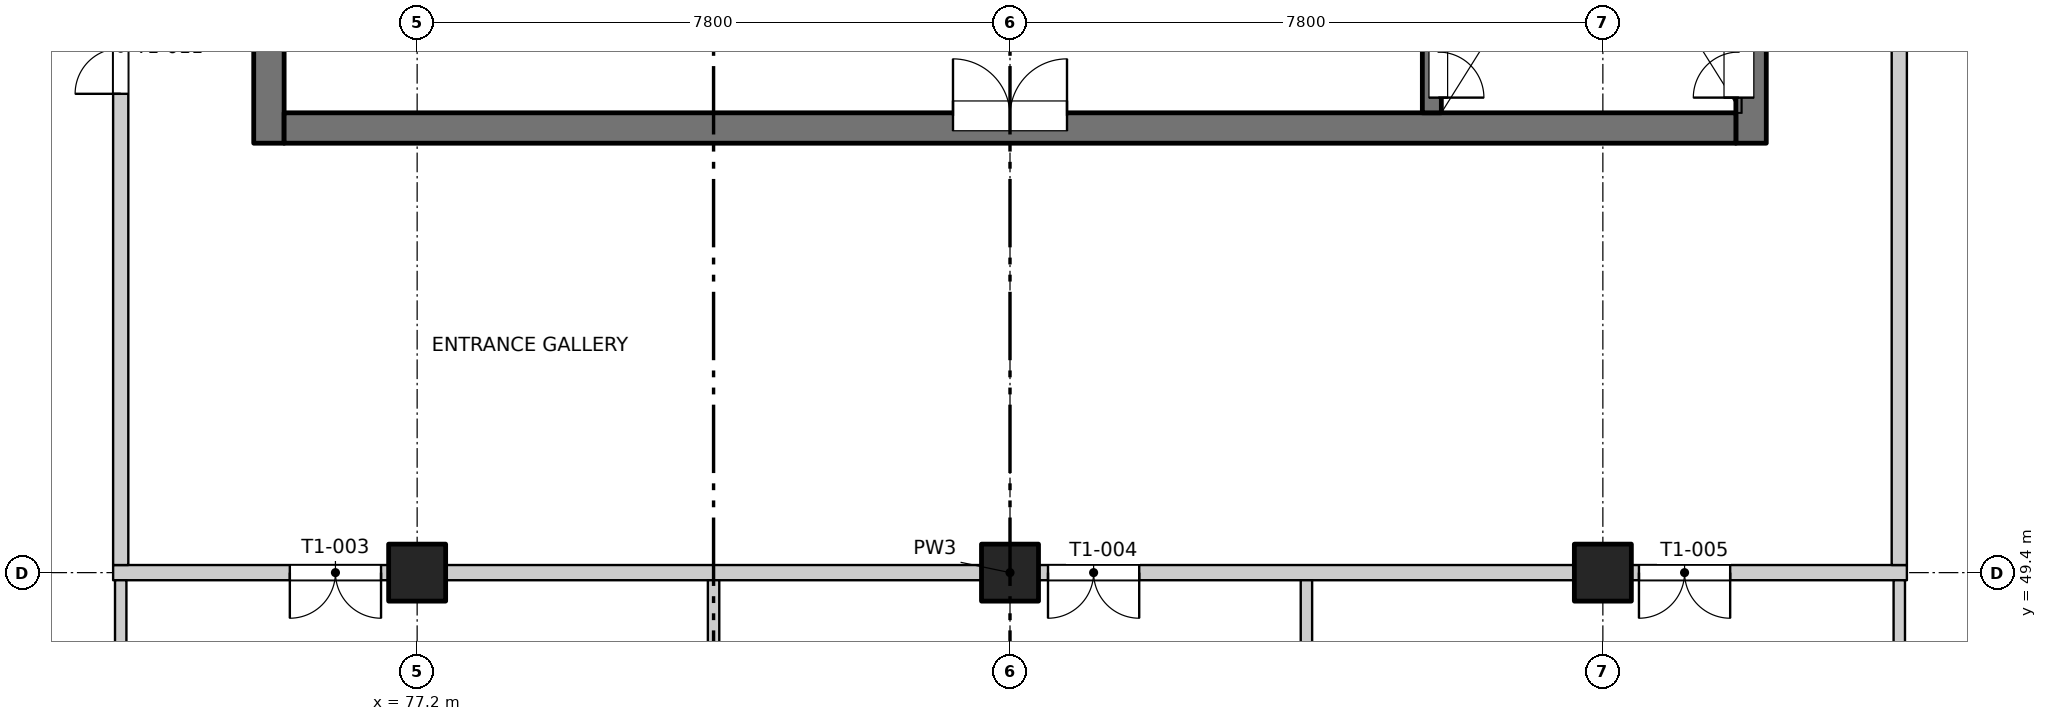
"""IFC4 building model, lengths in metres.
Left out: names, types, materials, properties, quantities, classifications, styles, units other than length and angle.
Written with IfcOpenShell. Run it as: python <this file> out.ifc"""

import sys

from ifc_helpers import new_model, si_unit, direction, frame, frame_2d, origin, origin_2d, place, context, subcontext, project, spatial, rectangle, extrude, element, fill, save


model = new_model("IFC4")
c1 = context("Model", 3, precision=1e-05, world=origin(), true_north=direction((0.0, 1.0)))
c2 = subcontext(c1, "Body", "Model", "MODEL_VIEW")
j1 = project(units=[si_unit("LENGTHUNIT", "METRE"), si_unit("PLANEANGLEUNIT", "RADIAN")], contexts=[c1])
p1 = place(None, origin())
s1 = spatial("IfcSite", under=j1, at=p1, CompositionType="ELEMENT")
p2 = place(p1, origin())
s2 = spatial("IfcBuilding", under=s1, at=p2, CompositionType="ELEMENT")
p3 = place(p2, frame((0.0, 0.0, 263.0)))
s3 = spatial("IfcBuildingStorey", under=s2, at=p3, CompositionType="ELEMENT", Elevation=263.0)
for number, where, z_axis, x_axis in (
    (1, (77.2, 49.4, -0.25), (0.0, 0.0, 1.0), (1.0, 0.0, 0.0)),
    (2, (85.0, 49.4, -0.25), (0.0, 0.0, 1.0), (1.0, 0.0, 0.0)),
    (3, (92.8, 49.4, -0.25), (0.0, 0.0, 1.0), (1.0, 0.0, 0.0)),
):
    element("IfcColumn", number, at=place(p3, frame(where, z_axis=z_axis, x_axis=x_axis)), inside=s3, PredefinedType="COLUMN", context=c2, shape_type="SweptSolid", body=[
        extrude(rectangle(XDim=0.75, YDim=0.75, at=origin_2d()), origin(), (0.0, 0.0, 1.0), 3.35),
    ])
p4 = place(p3, frame((75.25, 55.05, -0.25), z_axis=(0.0, 0.0, 1.0), x_axis=(0.0, 1.0, 0.0)))
e4 = element("IfcWall", 4, at=p4, inside=s3, PredefinedType="SOLIDWALL", context=c2, shape_type="SweptSolid", body=[
    extrude(rectangle(XDim=22.25, YDim=0.4, at=frame_2d((11.125, 0.0))), origin(), (0.0, 0.0, 1.0), 3.35),
])
p5 = place(p4, frame((7.4, 0.0, 0.25)))
e5 = element("IfcOpeningElement", 5, at=p5, cuts=e4, PredefinedType="OPENING", context=c2, shape_type="SweptSolid", body=[
    extrude(rectangle(XDim=0.9, YDim=2.1, at=frame_2d((0.45, 1.05))), frame((0.0, 0.21, 0.0), z_axis=(0.0, -1.0, 0.0), x_axis=(1.0, 0.0, 0.0)), (0.0, 0.0, 1.0), 0.42),
])
p6 = place(p4, frame((12.05, 0.0, 0.25)))
e6 = element("IfcOpeningElement", 6, at=p6, cuts=e4, PredefinedType="OPENING", context=c2, shape_type="SweptSolid", body=[
    extrude(rectangle(XDim=0.9, YDim=2.1, at=frame_2d((0.45, 1.05))), frame((0.0, 0.21, 0.0), z_axis=(0.0, -1.0, 0.0), x_axis=(1.0, 0.0, 0.0)), (0.0, 0.0, 1.0), 0.42),
])
p7 = place(p4, frame((16.55, 0.0, 0.25)))
e7 = element("IfcOpeningElement", 7, at=p7, cuts=e4, PredefinedType="OPENING", context=c2, shape_type="SweptSolid", body=[
    extrude(rectangle(XDim=0.9, YDim=2.1, at=frame_2d((0.45, 1.05))), frame((0.0, 0.21, 0.0), z_axis=(0.0, -1.0, 0.0), x_axis=(1.0, 0.0, 0.0)), (0.0, 0.0, 1.0), 0.42),
])
p8 = place(p4, frame((20.0, 0.0, 0.25)))
e8 = element("IfcOpeningElement", 8, at=p8, cuts=e4, PredefinedType="OPENING", context=c2, shape_type="SweptSolid", body=[
    extrude(rectangle(XDim=0.9, YDim=2.1, at=frame_2d((0.45, 1.05))), frame((0.0, 0.21, 0.0), z_axis=(0.0, -1.0, 0.0), x_axis=(1.0, 0.0, 0.0)), (0.0, 0.0, 1.0), 0.42),
])
p9 = place(p3, frame((94.75, 55.05, -0.25), z_axis=(0.0, 0.0, 1.0), x_axis=(0.0, 1.0, 0.0)))
e9 = element("IfcWall", 9, at=p9, inside=s3, PredefinedType="SOLIDWALL", context=c2, shape_type="SweptSolid", body=[
    extrude(rectangle(XDim=6.9, YDim=0.4, at=frame_2d((3.45, 0.0))), origin(), (0.0, 0.0, 1.0), 3.35),
])
p10 = place(p9, frame((0.6, 0.0, 0.25)))
e10 = element("IfcOpeningElement", 10, at=p10, cuts=e9, PredefinedType="OPENING", context=c2, shape_type="SweptSolid", body=[
    extrude(rectangle(XDim=1.2, YDim=2.1, at=frame_2d((0.6, 1.05))), frame((0.0, 0.21, 0.0), z_axis=(0.0, -1.0, 0.0), x_axis=(1.0, 0.0, 0.0)), (0.0, 0.0, 1.0), 0.42),
])
p11 = place(p3, frame((75.45, 55.25, -0.25), z_axis=(0.0, 0.0, 1.0), x_axis=(1.0, 0.0, 0.0)))
e11 = element("IfcWall", 11, at=p11, inside=s3, PredefinedType="SOLIDWALL", context=c2, shape_type="SweptSolid", body=[
    extrude(rectangle(XDim=19.1, YDim=0.4, at=frame_2d((9.55, 0.0))), origin(), (0.0, 0.0, 1.0), 3.35),
])
p12 = place(p11, frame((8.8, 0.0, 0.25)))
e12 = element("IfcOpeningElement", 12, at=p12, cuts=e11, PredefinedType="OPENING", context=c2, shape_type="SweptSolid", body=[
    extrude(rectangle(XDim=1.5, YDim=2.1, at=frame_2d((0.75, 1.05))), frame((0.0, 0.21, 0.0), z_axis=(0.0, -1.0, 0.0), x_axis=(1.0, 0.0, 0.0)), (0.0, 0.0, 1.0), 0.42),
])
p13 = place(p3, frame((90.55, 55.45, -0.25), z_axis=(0.0, 0.0, 1.0), x_axis=(0.0, 1.0, 0.0)))
e13 = element("IfcWall", 13, at=p13, inside=s3, PredefinedType="SOLIDWALL", context=c2, shape_type="SweptSolid", body=[
    extrude(rectangle(XDim=6.5, YDim=0.25, at=frame_2d((3.25, 0.0))), origin(), (0.0, 0.0, 1.0), 3.35),
])
p14 = place(p13, frame((0.2, 0.0, 0.25)))
e14 = element("IfcOpeningElement", 14, at=p14, cuts=e13, PredefinedType="OPENING", context=c2, shape_type="SweptSolid", body=[
    extrude(rectangle(XDim=1.2, YDim=2.1, at=frame_2d((0.6, 1.05))), frame((0.0, 0.135, 0.0), z_axis=(0.0, -1.0, 0.0), x_axis=(1.0, 0.0, 0.0)), (0.0, 0.0, 1.0), 0.27),
])
p15 = place(p3, frame((73.2, 49.4, 0.0), z_axis=(0.0, 0.0, 1.0), x_axis=(1.0, 0.0, 0.0)))
e15 = element("IfcWall", 15, at=p15, inside=s3, PredefinedType="PARTITIONING", context=c2, shape_type="SweptSolid", body=[
    extrude(rectangle(XDim=23.6, YDim=0.2, at=frame_2d((11.8, 0.0))), origin(), (0.0, 0.0, 1.0), 3.1),
])
p16 = place(p15, frame((2.325, 0.0, 0.0)))
e16 = element("IfcOpeningElement", 16, at=p16, cuts=e15, PredefinedType="OPENING", context=c2, shape_type="SweptSolid", body=[
    extrude(rectangle(XDim=1.2, YDim=2.1, at=frame_2d((0.6, 1.05))), frame((0.0, 0.11, 0.0), z_axis=(0.0, -1.0, 0.0), x_axis=(1.0, 0.0, 0.0)), (0.0, 0.0, 1.0), 0.22),
])
p17 = place(p15, frame((12.3, 0.0, 0.0)))
e17 = element("IfcOpeningElement", 17, at=p17, cuts=e15, PredefinedType="OPENING", context=c2, shape_type="SweptSolid", body=[
    extrude(rectangle(XDim=1.2, YDim=2.1, at=frame_2d((0.6, 1.05))), frame((0.0, 0.11, 0.0), z_axis=(0.0, -1.0, 0.0), x_axis=(1.0, 0.0, 0.0)), (0.0, 0.0, 1.0), 0.22),
])
p18 = place(p15, frame((20.075, 0.0, 0.0)))
e18 = element("IfcOpeningElement", 18, at=p18, cuts=e15, PredefinedType="OPENING", context=c2, shape_type="SweptSolid", body=[
    extrude(rectangle(XDim=1.2, YDim=2.1, at=frame_2d((0.6, 1.05))), frame((0.0, 0.11, 0.0), z_axis=(0.0, -1.0, 0.0), x_axis=(1.0, 0.0, 0.0)), (0.0, 0.0, 1.0), 0.22),
])
p19 = place(p3, frame((73.3, 45.635, 0.0), z_axis=(0.0, 0.0, 1.0), x_axis=(0.0, 1.0, 0.0)))
e19 = element("IfcWall", 19, at=p19, inside=s3, PredefinedType="PARTITIONING", context=c2, shape_type="SweptSolid", body=[
    extrude(rectangle(XDim=3.665, YDim=0.15, at=frame_2d((1.833, 0.0))), origin(), (0.0, 0.0, 1.0), 3.1),
])
p20 = place(p3, frame((73.3, 49.5, 0.0), z_axis=(0.0, 0.0, 1.0), x_axis=(0.0, 1.0, 0.0)))
e20 = element("IfcWall", 20, at=p20, inside=s3, PredefinedType="PARTITIONING", context=c2, shape_type="SweptSolid", body=[
    extrude(rectangle(XDim=34.865, YDim=0.2, at=frame_2d((17.433, 0.0))), origin(), (0.0, 0.0, 1.0), 3.1),
])
p21 = place(p20, frame((6.2, 0.0, 0.0)))
e21 = element("IfcOpeningElement", 21, at=p21, cuts=e20, PredefinedType="OPENING", context=c2, shape_type="SweptSolid", body=[
    extrude(rectangle(XDim=1.2, YDim=2.1, at=frame_2d((0.6, 1.05))), frame((0.0, 0.11, 0.0), z_axis=(0.0, -1.0, 0.0), x_axis=(1.0, 0.0, 0.0)), (0.0, 0.0, 1.0), 0.22),
])
p22 = place(p20, frame((12.95, 0.0, 0.0)))
e22 = element("IfcOpeningElement", 22, at=p22, cuts=e20, PredefinedType="OPENING", context=c2, shape_type="SweptSolid", body=[
    extrude(rectangle(XDim=1.2, YDim=2.1, at=frame_2d((0.6, 1.05))), frame((0.0, 0.11, 0.0), z_axis=(0.0, -1.0, 0.0), x_axis=(1.0, 0.0, 0.0)), (0.0, 0.0, 1.0), 0.22),
])
p23 = place(p20, frame((24.65, 0.0, 0.0)))
e23 = element("IfcOpeningElement", 23, at=p23, cuts=e20, PredefinedType="OPENING", context=c2, shape_type="SweptSolid", body=[
    extrude(rectangle(XDim=1.2, YDim=2.1, at=frame_2d((0.6, 1.05))), frame((0.0, 0.11, 0.0), z_axis=(0.0, -1.0, 0.0), x_axis=(1.0, 0.0, 0.0)), (0.0, 0.0, 1.0), 0.22),
])
p24 = place(p20, frame((27.571, 0.0, 0.0)))
e24 = element("IfcOpeningElement", 24, at=p24, cuts=e20, PredefinedType="OPENING", context=c2, shape_type="SweptSolid", body=[
    extrude(rectangle(XDim=0.9, YDim=2.1, at=frame_2d((0.45, 1.05))), frame((0.0, 0.11, 0.0), z_axis=(0.0, -1.0, 0.0), x_axis=(1.0, 0.0, 0.0)), (0.0, 0.0, 1.0), 0.22),
])
p25 = place(p20, frame((32.45, 0.0, 0.0)))
e25 = element("IfcOpeningElement", 25, at=p25, cuts=e20, PredefinedType="OPENING", context=c2, shape_type="SweptSolid", body=[
    extrude(rectangle(XDim=1.2, YDim=2.1, at=frame_2d((0.6, 1.05))), frame((0.0, 0.11, 0.0), z_axis=(0.0, -1.0, 0.0), x_axis=(1.0, 0.0, 0.0)), (0.0, 0.0, 1.0), 0.22),
])
for number, where, z_axis, x_axis in (
    (26, (81.1, 45.635, 0.0), (0.0, 0.0, 1.0), (0.0, 1.0, 0.0)),
    (27, (88.9, 45.635, 0.0), (0.0, 0.0, 1.0), (0.0, 1.0, 0.0)),
    (28, (96.7, 45.635, 0.0), (0.0, 0.0, 1.0), (0.0, 1.0, 0.0)),
):
    element("IfcWall", number, at=place(p3, frame(where, z_axis=z_axis, x_axis=x_axis)), inside=s3, PredefinedType="PARTITIONING", context=c2, shape_type="SweptSolid", body=[
        extrude(rectangle(XDim=3.665, YDim=0.15, at=frame_2d((1.833, 0.0))), origin(), (0.0, 0.0, 1.0), 3.1),
    ])
p26 = place(p3, frame((96.7, 49.5, 0.0), z_axis=(0.0, 0.0, 1.0), x_axis=(0.0, 1.0, 0.0)))
e29 = element("IfcWall", 29, at=p26, inside=s3, PredefinedType="PARTITIONING", context=c2, shape_type="SweptSolid", body=[
    extrude(rectangle(XDim=34.865, YDim=0.2, at=frame_2d((17.433, 0.0))), origin(), (0.0, 0.0, 1.0), 3.1),
])
p27 = place(p26, frame((9.05, 0.0, 0.0)))
e30 = element("IfcOpeningElement", 30, at=p27, cuts=e29, PredefinedType="OPENING", context=c2, shape_type="SweptSolid", body=[
    extrude(rectangle(XDim=1.2, YDim=2.1, at=frame_2d((0.6, 1.05))), frame((0.0, 0.11, 0.0), z_axis=(0.0, -1.0, 0.0), x_axis=(1.0, 0.0, 0.0)), (0.0, 0.0, 1.0), 0.22),
])
p28 = place(p26, frame((20.75, 0.0, 0.0)))
e31 = element("IfcOpeningElement", 31, at=p28, cuts=e29, PredefinedType="OPENING", context=c2, shape_type="SweptSolid", body=[
    extrude(rectangle(XDim=1.2, YDim=2.1, at=frame_2d((0.6, 1.05))), frame((0.0, 0.11, 0.0), z_axis=(0.0, -1.0, 0.0), x_axis=(1.0, 0.0, 0.0)), (0.0, 0.0, 1.0), 0.22),
])
p29 = place(p26, frame((24.65, 0.0, 0.0)))
e32 = element("IfcOpeningElement", 32, at=p29, cuts=e29, PredefinedType="OPENING", context=c2, shape_type="SweptSolid", body=[
    extrude(rectangle(XDim=1.2, YDim=2.1, at=frame_2d((0.6, 1.05))), frame((0.0, 0.11, 0.0), z_axis=(0.0, -1.0, 0.0), x_axis=(1.0, 0.0, 0.0)), (0.0, 0.0, 1.0), 0.22),
])
p30 = place(p26, frame((31.825, 0.0, 0.0)))
e33 = element("IfcOpeningElement", 33, at=p30, cuts=e29, PredefinedType="OPENING", context=c2, shape_type="SweptSolid", body=[
    extrude(rectangle(XDim=1.2, YDim=2.1, at=frame_2d((0.6, 1.05))), frame((0.0, 0.11, 0.0), z_axis=(0.0, -1.0, 0.0), x_axis=(1.0, 0.0, 0.0)), (0.0, 0.0, 1.0), 0.22),
])
p31 = place(p26, frame((33.65, 0.0, 0.0)))
e34 = element("IfcOpeningElement", 34, at=p31, cuts=e29, PredefinedType="OPENING", context=c2, shape_type="SweptSolid", body=[
    extrude(rectangle(XDim=0.9, YDim=2.1, at=frame_2d((0.45, 1.05))), frame((0.0, 0.11, 0.0), z_axis=(0.0, -1.0, 0.0), x_axis=(1.0, 0.0, 0.0)), (0.0, 0.0, 1.0), 0.22),
])
p32 = place(p16, origin())
e35 = element("IfcDoor", 35, at=p32, inside=s3, OperationType="DOUBLE_DOOR_SINGLE_SWING", PredefinedType="DOOR", context=c2, shape_type="SweptSolid", body=[
    extrude(rectangle(XDim=1.2, YDim=2.1, at=frame_2d((0.6, 1.05))), frame((0.0, 0.025, 0.0), z_axis=(0.0, -1.0, 0.0), x_axis=(1.0, 0.0, 0.0)), (0.0, 0.0, 1.0), 0.05),
])
fill(e16, e35)
p33 = place(p17, origin())
e36 = element("IfcDoor", 36, at=p33, inside=s3, OperationType="DOUBLE_DOOR_SINGLE_SWING", PredefinedType="DOOR", context=c2, shape_type="SweptSolid", body=[
    extrude(rectangle(XDim=1.2, YDim=2.1, at=frame_2d((0.6, 1.05))), frame((0.0, 0.025, 0.0), z_axis=(0.0, -1.0, 0.0), x_axis=(1.0, 0.0, 0.0)), (0.0, 0.0, 1.0), 0.05),
])
fill(e17, e36)
p34 = place(p18, origin())
e37 = element("IfcDoor", 37, at=p34, inside=s3, OperationType="DOUBLE_DOOR_SINGLE_SWING", PredefinedType="DOOR", context=c2, shape_type="SweptSolid", body=[
    extrude(rectangle(XDim=1.2, YDim=2.1, at=frame_2d((0.6, 1.05))), frame((0.0, 0.025, 0.0), z_axis=(0.0, -1.0, 0.0), x_axis=(1.0, 0.0, 0.0)), (0.0, 0.0, 1.0), 0.05),
])
fill(e18, e37)
p35 = place(p12, origin())
e38 = element("IfcDoor", 38, at=p35, inside=s3, OperationType="DOUBLE_DOOR_SINGLE_SWING", PredefinedType="DOOR", context=c2, shape_type="SweptSolid", body=[
    extrude(rectangle(XDim=1.5, YDim=2.1, at=frame_2d((0.75, 1.05))), frame((0.0, 0.185, 0.0), z_axis=(0.0, -1.0, 0.0), x_axis=(1.0, 0.0, 0.0)), (0.0, 0.0, 1.0), 0.05),
])
fill(e12, e38)
p36 = place(p14, origin())
e39 = element("IfcDoor", 39, at=p36, inside=s3, OperationType="DOUBLE_DOOR_SINGLE_SWING", PredefinedType="DOOR", context=c2, shape_type="SweptSolid", body=[
    extrude(rectangle(XDim=1.2, YDim=2.1, at=frame_2d((0.6, 1.05))), frame((0.0, -0.06, 0.0), z_axis=(0.0, -1.0, 0.0), x_axis=(1.0, 0.0, 0.0)), (0.0, 0.0, 1.0), 0.05),
])
fill(e14, e39)
p37 = place(p10, origin())
e40 = element("IfcDoor", 40, at=p37, inside=s3, OperationType="DOUBLE_DOOR_SINGLE_SWING", PredefinedType="DOOR", context=c2, shape_type="SweptSolid", body=[
    extrude(rectangle(XDim=1.2, YDim=2.1, at=frame_2d((0.6, 1.05))), frame((0.0, 0.185, 0.0), z_axis=(0.0, -1.0, 0.0), x_axis=(1.0, 0.0, 0.0)), (0.0, 0.0, 1.0), 0.05),
])
fill(e10, e40)
p38 = place(p21, origin())
e41 = element("IfcDoor", 41, at=p38, inside=s3, OperationType="DOUBLE_DOOR_SINGLE_SWING", PredefinedType="DOOR", context=c2, shape_type="SweptSolid", body=[
    extrude(rectangle(XDim=1.2, YDim=2.1, at=frame_2d((0.6, 1.05))), frame((0.0, 0.025, 0.0), z_axis=(0.0, -1.0, 0.0), x_axis=(1.0, 0.0, 0.0)), (0.0, 0.0, 1.0), 0.05),
])
fill(e21, e41)
save(model, sys.argv[1])
